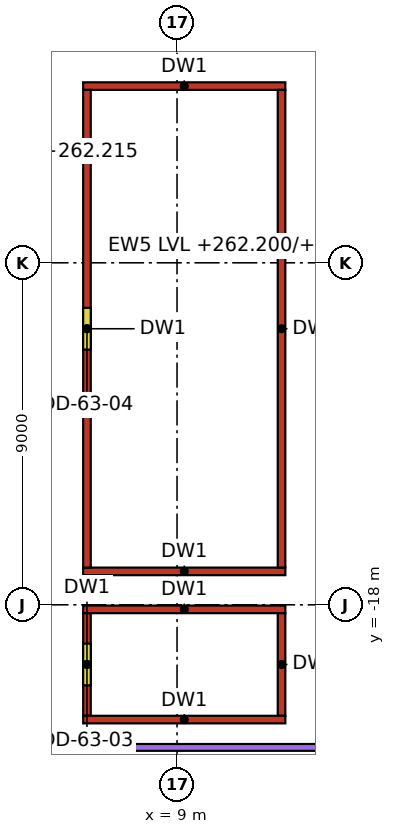
"""IFC4 building model, lengths in metres.
Left out: names, types, materials, properties, quantities, classifications, styles, units other than length and angle.
Written with IfcOpenShell. Run it as: python <this file> out.ifc"""

import sys

from ifc_helpers import new_model, si_unit, direction, frame, frame_2d, origin, place, context, subcontext, project, spatial, rectangle, extrude, element, fill, save


model = new_model("IFC4")
c1 = context("Model", 3, precision=1e-05, world=origin(), true_north=direction((0.0, 1.0)))
c2 = subcontext(c1, "Body", "Model", "MODEL_VIEW")
j1 = project(units=[si_unit("LENGTHUNIT", "METRE"), si_unit("PLANEANGLEUNIT", "RADIAN")], contexts=[c1])
p1 = place(None, origin())
s1 = spatial("IfcSite", under=j1, at=p1, CompositionType="ELEMENT")
p2 = place(p1, origin())
s2 = spatial("IfcBuilding", under=s1, at=p2, CompositionType="ELEMENT")
p3 = place(p2, frame((0.0, 0.0, 262.2)))
s3 = spatial("IfcBuildingStorey", under=s2, at=p3, CompositionType="ELEMENT", Elevation=262.2)
for number, where, z_axis, x_axis in (
    (1, (6.53, -21.02, 0.0), (0.0, 0.0, 1.0), (1.0, 0.0, 0.0)),
    (2, (6.53, -18.12, 0.0), (0.0, 0.0, 1.0), (1.0, 0.0, 0.0)),
):
    element("IfcWall", number, at=place(p3, frame(where, z_axis=z_axis, x_axis=x_axis)), inside=s3, PredefinedType="PARTITIONING", context=c2, shape_type="SweptSolid", body=[
        extrude(rectangle(XDim=5.32, YDim=0.2, at=frame_2d((2.66, 0.0))), origin(), (0.0, 0.0, 1.0), 3.3),
    ])
p4 = place(p3, frame((6.63, -20.92, 0.0), z_axis=(0.0, 0.0, 1.0), x_axis=(0.0, 1.0, 0.0)))
e3 = element("IfcWall", 3, at=p4, inside=s3, PredefinedType="PARTITIONING", context=c2, shape_type="SweptSolid", body=[
    extrude(rectangle(XDim=2.7, YDim=0.2, at=frame_2d((1.35, 0.0))), origin(), (0.0, 0.0, 1.0), 3.3),
])
p5 = place(p4, frame((0.8, 0.0, 0.0)))
e4 = element("IfcOpeningElement", 4, at=p5, cuts=e3, PredefinedType="OPENING", context=c2, shape_type="SweptSolid", body=[
    extrude(rectangle(XDim=1.1, YDim=2.1, at=frame_2d((0.55, 1.05))), frame((0.0, 0.1, 0.0), z_axis=(0.0, -1.0, 0.0), x_axis=(1.0, 0.0, 0.0)), (0.0, 0.0, 1.0), 0.2),
])
p6 = place(p3, frame((11.75, -20.92, 0.0), z_axis=(0.0, 0.0, 1.0), x_axis=(0.0, 1.0, 0.0)))
e5 = element("IfcWall", 5, at=p6, inside=s3, PredefinedType="PARTITIONING", context=c2, shape_type="SweptSolid", body=[
    extrude(rectangle(XDim=2.7, YDim=0.2, at=frame_2d((1.35, 0.0))), origin(), (0.0, 0.0, 1.0), 3.3),
])
for number, where, z_axis, x_axis in (
    (6, (6.53, -17.12, 0.0), (0.0, 0.0, 1.0), (1.0, 0.0, 0.0)),
    (7, (6.53, -4.35, 0.0), (0.0, 0.0, 1.0), (1.0, 0.0, 0.0)),
):
    element("IfcWall", number, at=place(p3, frame(where, z_axis=z_axis, x_axis=x_axis)), inside=s3, PredefinedType="PARTITIONING", context=c2, shape_type="SweptSolid", body=[
        extrude(rectangle(XDim=5.32, YDim=0.2, at=frame_2d((2.66, 0.0))), origin(), (0.0, 0.0, 1.0), 3.3),
    ])
p7 = place(p3, frame((6.63, -17.02, 0.0), z_axis=(0.0, 0.0, 1.0), x_axis=(0.0, 1.0, 0.0)))
e8 = element("IfcWall", 8, at=p7, inside=s3, PredefinedType="PARTITIONING", context=c2, shape_type="SweptSolid", body=[
    extrude(rectangle(XDim=12.57, YDim=0.2, at=frame_2d((6.285, 0.0))), origin(), (0.0, 0.0, 1.0), 3.3),
])
p8 = place(p7, frame((5.735, 0.0, 0.0)))
e9 = element("IfcOpeningElement", 9, at=p8, cuts=e8, PredefinedType="OPENING", context=c2, shape_type="SweptSolid", body=[
    extrude(rectangle(XDim=1.1, YDim=2.1, at=frame_2d((0.55, 1.05))), frame((0.0, 0.1, 0.0), z_axis=(0.0, -1.0, 0.0), x_axis=(1.0, 0.0, 0.0)), (0.0, 0.0, 1.0), 0.2),
])
p9 = place(p3, frame((11.75, -17.02, 0.0), z_axis=(0.0, 0.0, 1.0), x_axis=(0.0, 1.0, 0.0)))
e10 = element("IfcWall", 10, at=p9, inside=s3, PredefinedType="PARTITIONING", context=c2, shape_type="SweptSolid", body=[
    extrude(rectangle(XDim=12.57, YDim=0.2, at=frame_2d((6.285, 0.0))), origin(), (0.0, 0.0, 1.0), 3.3),
])
p10 = place(p5, frame((1.1, 0.0, 0.0), z_axis=(0.0, 0.0, 1.0), x_axis=(-1.0, 0.0, 0.0)))
e11 = element("IfcDoor", 11, at=p10, inside=s3, OperationType="SINGLE_SWING_LEFT", PredefinedType="DOOR", context=c2, shape_type="SweptSolid", body=[
    extrude(rectangle(XDim=1.1, YDim=2.1, at=frame_2d((0.55, 1.05))), frame((0.0, 0.025, 0.0), z_axis=(0.0, -1.0, 0.0), x_axis=(1.0, 0.0, 0.0)), (0.0, 0.0, 1.0), 0.05),
])
fill(e4, e11)
p11 = place(p8, frame((1.1, 0.0, 0.0), z_axis=(0.0, 0.0, 1.0), x_axis=(-1.0, 0.0, 0.0)))
e12 = element("IfcDoor", 12, at=p11, inside=s3, OperationType="SINGLE_SWING_LEFT", PredefinedType="DOOR", context=c2, shape_type="SweptSolid", body=[
    extrude(rectangle(XDim=1.1, YDim=2.1, at=frame_2d((0.55, 1.05))), frame((0.0, 0.025, 0.0), z_axis=(0.0, -1.0, 0.0), x_axis=(1.0, 0.0, 0.0)), (0.0, 0.0, 1.0), 0.05),
])
fill(e9, e12)
save(model, sys.argv[1])
